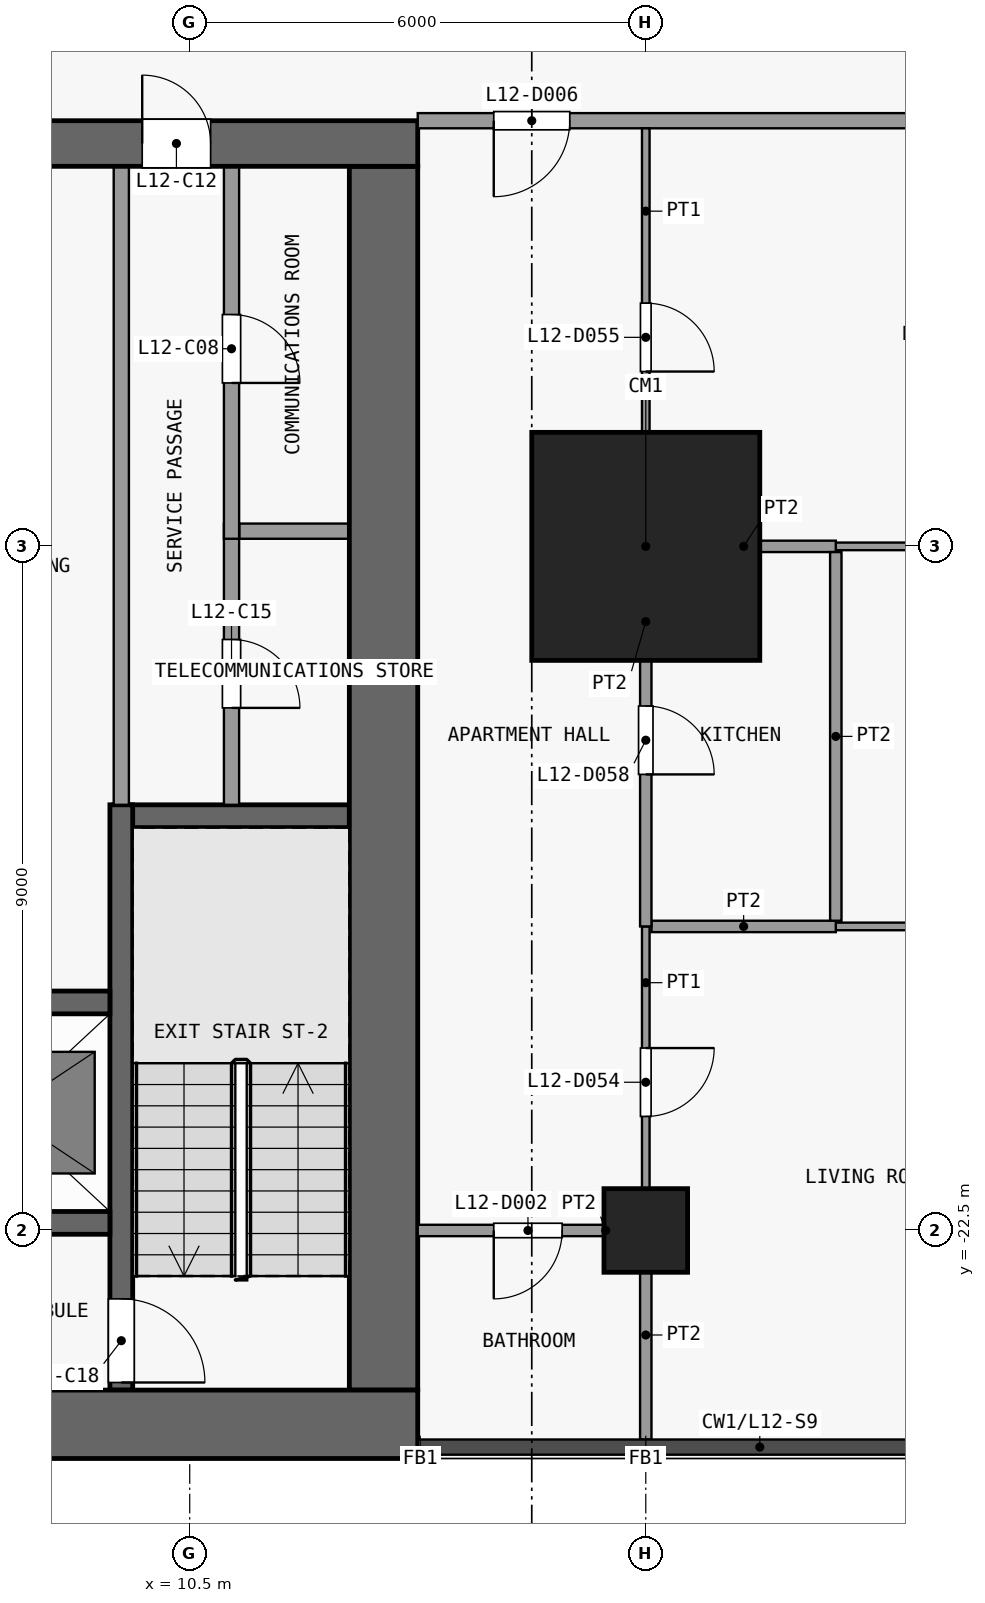
"""IFC4 building model, lengths in metres.
Left out: names, types, materials, properties, quantities, classifications, styles, units other than length and angle.
Written with IfcOpenShell. Run it as: python <this file> out.ifc"""

import sys

from ifc_helpers import new_model, si_unit, direction, frame, frame_2d, origin, origin_2d, place, context, subcontext, project, spatial, rectangle, extrude, element, fill, save


model = new_model("IFC4")
c1 = context("Model", 3, precision=1e-05, world=origin(), true_north=direction((0.0, 1.0)))
c2 = subcontext(c1, "Body", "Model", "MODEL_VIEW")
j1 = project(units=[si_unit("LENGTHUNIT", "METRE"), si_unit("PLANEANGLEUNIT", "RADIAN")], contexts=[c1])
p1 = place(None, origin())
s1 = spatial("IfcSite", under=j1, at=p1, CompositionType="ELEMENT")
p2 = place(p1, origin())
s2 = spatial("IfcBuilding", under=s1, at=p2, CompositionType="ELEMENT")
p3 = place(p2, frame((0.0, 0.0, 54.1)))
s3 = spatial("IfcBuildingStorey", under=s2, at=p3, CompositionType="ELEMENT", Elevation=54.1)
p4 = place(p3, frame((16.5, -22.5, 0.0), z_axis=(0.0, 0.0, 1.0), x_axis=(1.0, 0.0, 0.0)))
e1 = element("IfcColumn", 1, at=p4, inside=s3, PredefinedType="COLUMN", context=c2, shape_type="SweptSolid", body=[
    extrude(rectangle(XDim=1.1, YDim=1.1, at=origin_2d()), origin(), (0.0, 0.0, 1.0), 3.6),
])
p5 = place(p3, frame((16.5, -13.5, 0.0), z_axis=(0.0, 0.0, 1.0), x_axis=(1.0, 0.0, 0.0)))
e2 = element("IfcColumn", 2, at=p5, inside=s3, PredefinedType="COLUMN", context=c2, shape_type="SweptSolid", body=[
    extrude(rectangle(XDim=3.0, YDim=3.0, at=origin_2d()), origin(), (0.0, 0.0, 1.0), 3.6),
])
p6 = place(p3, frame((-13.5, -25.05, 0.0), z_axis=(0.0, 0.0, 1.0), x_axis=(1.0, 0.0, 0.0)))
e3 = element("IfcWall", 3, at=p6, inside=s3, PredefinedType="SHEAR", context=c2, shape_type="SweptSolid", body=[
    extrude(rectangle(XDim=27.0, YDim=0.9, at=frame_2d((13.5, 0.0))), origin(), (0.0, 0.0, 1.0), 3.3),
])
p7 = place(p3, frame((-13.5, -8.2, 0.0), z_axis=(0.0, 0.0, 1.0), x_axis=(1.0, 0.0, 0.0)))
e4 = element("IfcWall", 4, at=p7, inside=s3, PredefinedType="SHEAR", context=c2, shape_type="SweptSolid", body=[
    extrude(rectangle(XDim=27.0, YDim=0.6, at=frame_2d((13.5, 0.0))), origin(), (0.0, 0.0, 1.0), 3.3),
])
p8 = place(p7, frame((7.8, 0.0, 0.0)))
e5 = element("IfcOpeningElement", 5, at=p8, cuts=e4, PredefinedType="OPENING", context=c2, shape_type="SweptSolid", body=[
    extrude(rectangle(XDim=1.8, YDim=2.1, at=frame_2d((0.9, 1.05))), frame((0.0, 0.31, 0.0), z_axis=(0.0, -1.0, 0.0), x_axis=(1.0, 0.0, 0.0)), (0.0, 0.0, 1.0), 0.62),
])
p9 = place(p7, frame((17.4, 0.0, 0.0)))
e6 = element("IfcOpeningElement", 6, at=p9, cuts=e4, PredefinedType="OPENING", context=c2, shape_type="SweptSolid", body=[
    extrude(rectangle(XDim=1.8, YDim=2.1, at=frame_2d((0.9, 1.05))), frame((0.0, 0.31, 0.0), z_axis=(0.0, -1.0, 0.0), x_axis=(1.0, 0.0, 0.0)), (0.0, 0.0, 1.0), 0.62),
])
p10 = place(p7, frame((2.725, 0.0, 0.0)))
e7 = element("IfcOpeningElement", 7, at=p10, cuts=e4, PredefinedType="OPENING", context=c2, shape_type="SweptSolid", body=[
    extrude(rectangle(XDim=0.9, YDim=2.1, at=frame_2d((0.45, 1.05))), frame((0.0, 0.31, 0.0), z_axis=(0.0, -1.0, 0.0), x_axis=(1.0, 0.0, 0.0)), (0.0, 0.0, 1.0), 0.62),
])
p11 = place(p7, frame((23.375, 0.0, 0.0)))
e8 = element("IfcOpeningElement", 8, at=p11, cuts=e4, PredefinedType="OPENING", context=c2, shape_type="SweptSolid", body=[
    extrude(rectangle(XDim=0.9, YDim=2.1, at=frame_2d((0.45, 1.05))), frame((0.0, 0.31, 0.0), z_axis=(0.0, -1.0, 0.0), x_axis=(1.0, 0.0, 0.0)), (0.0, 0.0, 1.0), 0.62),
])
p12 = place(p3, frame((13.05, -24.6, 0.0), z_axis=(0.0, 0.0, 1.0), x_axis=(0.0, 1.0, 0.0)))
e9 = element("IfcWall", 9, at=p12, inside=s3, PredefinedType="SHEAR", context=c2, shape_type="SweptSolid", body=[
    extrude(rectangle(XDim=16.1, YDim=0.9, at=frame_2d((8.05, 0.0))), origin(), (0.0, 0.0, 1.0), 3.3),
])
p13 = place(p3, frame((6.35, -22.4, 0.0), z_axis=(0.0, 0.0, 1.0), x_axis=(1.0, 0.0, 0.0)))
e10 = element("IfcWall", 10, at=p13, inside=s3, PredefinedType="SHEAR", context=c2, shape_type="SweptSolid", body=[
    extrude(rectangle(XDim=3.1, YDim=0.3, at=frame_2d((1.55, 0.0))), origin(), (0.0, 0.0, 1.0), 3.3),
])
p14 = place(p3, frame((6.425, -19.5, 0.0), z_axis=(0.0, 0.0, 1.0), x_axis=(1.0, 0.0, 0.0)))
e11 = element("IfcWall", 11, at=p14, inside=s3, PredefinedType="SHEAR", context=c2, shape_type="SweptSolid", body=[
    extrude(rectangle(XDim=3.025, YDim=0.3, at=frame_2d((1.512, 0.0))), origin(), (0.0, 0.0, 1.0), 3.3),
])
p15 = place(p3, frame((9.5, -17.05, 0.0), z_axis=(0.0, 0.0, 1.0), x_axis=(1.0, 0.0, 0.0)))
e12 = element("IfcWall", 12, at=p15, inside=s3, PredefinedType="SHEAR", context=c2, shape_type="SweptSolid", body=[
    extrude(rectangle(XDim=3.1, YDim=0.3, at=frame_2d((1.55, 0.0))), origin(), (0.0, 0.0, 1.0), 3.3),
])
p16 = place(p3, frame((11.15, -13.3, 0.0), z_axis=(0.0, 0.0, 1.0), x_axis=(1.0, 0.0, 0.0)))
e13 = element("IfcWall", 13, at=p16, inside=s3, PredefinedType="PARTITIONING", context=c2, shape_type="SweptSolid", body=[
    extrude(rectangle(XDim=1.45, YDim=0.2, at=frame_2d((0.725, 0.0))), origin(), (0.0, 0.0, 1.0), 3.3),
])
p17 = place(p3, frame((9.6, -16.9, 0.0), z_axis=(0.0, 0.0, 1.0), x_axis=(0.0, -1.0, 0.0)))
e14 = element("IfcWall", 14, at=p17, inside=s3, PredefinedType="SHEAR", context=c2, shape_type="SweptSolid", body=[
    extrude(rectangle(XDim=7.7, YDim=0.3, at=frame_2d((3.85, 0.0))), origin(), (0.0, 0.0, 1.0), 3.3),
])
p18 = place(p17, frame((6.5, 0.0, 0.0)))
e15 = element("IfcOpeningElement", 15, at=p18, cuts=e14, PredefinedType="OPENING", context=c2, shape_type="SweptSolid", body=[
    extrude(rectangle(XDim=1.1, YDim=2.1, at=frame_2d((0.55, 1.05))), frame((0.0, 0.16, 0.0), z_axis=(0.0, -1.0, 0.0), x_axis=(1.0, 0.0, 0.0)), (0.0, 0.0, 1.0), 0.32),
])
p19 = place(p3, frame((9.6, -16.9, 0.0), z_axis=(0.0, 0.0, 1.0), x_axis=(0.0, 1.0, 0.0)))
e16 = element("IfcWall", 16, at=p19, inside=s3, PredefinedType="PARTITIONING", context=c2, shape_type="SweptSolid", body=[
    extrude(rectangle(XDim=8.4, YDim=0.2, at=frame_2d((4.2, 0.0))), origin(), (0.0, 0.0, 1.0), 3.3),
])
p20 = place(p3, frame((11.05, -13.2, 0.0), z_axis=(0.0, 0.0, 1.0), x_axis=(0.0, -1.0, 0.0)))
e17 = element("IfcWall", 17, at=p20, inside=s3, PredefinedType="PARTITIONING", context=c2, shape_type="SweptSolid", body=[
    extrude(rectangle(XDim=3.7, YDim=0.2, at=frame_2d((1.85, 0.0))), origin(), (0.0, 0.0, 1.0), 3.3),
])
p21 = place(p20, frame((1.525, 0.0, 0.0)))
e18 = element("IfcOpeningElement", 18, at=p21, cuts=e17, PredefinedType="OPENING", context=c2, shape_type="SweptSolid", body=[
    extrude(rectangle(XDim=0.9, YDim=2.1, at=frame_2d((0.45, 1.05))), frame((0.0, 0.11, 0.0), z_axis=(0.0, -1.0, 0.0), x_axis=(1.0, 0.0, 0.0)), (0.0, 0.0, 1.0), 0.22),
])
p22 = place(p3, frame((11.05, -8.5, 0.0), z_axis=(0.0, 0.0, 1.0), x_axis=(0.0, -1.0, 0.0)))
e19 = element("IfcWall", 19, at=p22, inside=s3, PredefinedType="PARTITIONING", context=c2, shape_type="SweptSolid", body=[
    extrude(rectangle(XDim=4.9, YDim=0.2, at=frame_2d((2.45, 0.0))), origin(), (0.0, 0.0, 1.0), 3.3),
])
p23 = place(p22, frame((1.95, 0.0, 0.0)))
e20 = element("IfcOpeningElement", 20, at=p23, cuts=e19, PredefinedType="OPENING", context=c2, shape_type="SweptSolid", body=[
    extrude(rectangle(XDim=0.9, YDim=2.1, at=frame_2d((0.45, 1.05))), frame((0.0, 0.11, 0.0), z_axis=(0.0, -1.0, 0.0), x_axis=(1.0, 0.0, 0.0)), (0.0, 0.0, 1.0), 0.22),
])
p24 = place(p3, frame((13.5, -22.5, 0.0), z_axis=(0.0, 0.0, 1.0), x_axis=(1.0, 0.0, 0.0)))
e21 = element("IfcWall", 21, at=p24, inside=s3, PredefinedType="PARTITIONING", context=c2, shape_type="SweptSolid", body=[
    extrude(rectangle(XDim=2.925, YDim=0.15, at=frame_2d((1.462, 0.0))), origin(), (0.0, 0.0, 1.0), 3.3),
])
p25 = place(p24, frame((1.0, 0.0, 0.0)))
e22 = element("IfcOpeningElement", 22, at=p25, cuts=e21, PredefinedType="OPENING", context=c2, shape_type="SweptSolid", body=[
    extrude(rectangle(XDim=0.9, YDim=2.1, at=frame_2d((0.45, 1.05))), frame((0.0, 0.085, 0.0), z_axis=(0.0, -1.0, 0.0), x_axis=(1.0, 0.0, 0.0)), (0.0, 0.0, 1.0), 0.17),
])
p26 = place(p3, frame((19.0, -18.5, 0.0), z_axis=(0.0, 0.0, 1.0), x_axis=(1.0, 0.0, 0.0)))
e23 = element("IfcWall", 23, at=p26, inside=s3, PredefinedType="PARTITIONING", context=c2, shape_type="SweptSolid", body=[
    extrude(rectangle(XDim=6.25, YDim=0.1, at=frame_2d((3.125, 0.0))), origin(), (0.0, 0.0, 1.0), 3.3),
])
p27 = place(p26, frame((2.7, 0.0, 0.0)))
e24 = element("IfcOpeningElement", 24, at=p27, cuts=e23, PredefinedType="OPENING", context=c2, shape_type="SweptSolid", body=[
    extrude(rectangle(XDim=0.9, YDim=2.1, at=frame_2d((0.45, 1.05))), frame((0.0, 0.06, 0.0), z_axis=(0.0, -1.0, 0.0), x_axis=(1.0, 0.0, 0.0)), (0.0, 0.0, 1.0), 0.12),
])
p28 = place(p3, frame((16.575, -18.5, 0.0), z_axis=(0.0, 0.0, 1.0), x_axis=(1.0, 0.0, 0.0)))
e25 = element("IfcWall", 25, at=p28, inside=s3, PredefinedType="PARTITIONING", context=c2, shape_type="SweptSolid", body=[
    extrude(rectangle(XDim=2.425, YDim=0.15, at=frame_2d((1.212, 0.0))), origin(), (0.0, 0.0, 1.0), 3.3),
])
p29 = place(p3, frame((19.0, -13.5, 0.0), z_axis=(0.0, 0.0, 1.0), x_axis=(1.0, 0.0, 0.0)))
e26 = element("IfcWall", 26, at=p29, inside=s3, PredefinedType="PARTITIONING", context=c2, shape_type="SweptSolid", body=[
    extrude(rectangle(XDim=6.25, YDim=0.1, at=frame_2d((3.125, 0.0))), origin(), (0.0, 0.0, 1.0), 3.3),
])
p30 = place(p3, frame((16.575, -13.5, 0.0), z_axis=(0.0, 0.0, 1.0), x_axis=(1.0, 0.0, 0.0)))
e27 = element("IfcWall", 27, at=p30, inside=s3, PredefinedType="PARTITIONING", context=c2, shape_type="SweptSolid", body=[
    extrude(rectangle(XDim=2.425, YDim=0.15, at=frame_2d((1.212, 0.0))), origin(), (0.0, 0.0, 1.0), 3.3),
])
p31 = place(p3, frame((13.5, -7.9, 0.0), z_axis=(0.0, 0.0, 1.0), x_axis=(1.0, 0.0, 0.0)))
e28 = element("IfcWall", 28, at=p31, inside=s3, PredefinedType="PARTITIONING", context=c2, shape_type="SweptSolid", body=[
    extrude(rectangle(XDim=11.75, YDim=0.2, at=frame_2d((5.875, 0.0))), origin(), (0.0, 0.0, 1.0), 3.3),
])
p32 = place(p31, frame((1.0, 0.0, 0.0)))
e29 = element("IfcOpeningElement", 29, at=p32, cuts=e28, PredefinedType="OPENING", context=c2, shape_type="SweptSolid", body=[
    extrude(rectangle(XDim=1.0, YDim=2.1, at=frame_2d((0.5, 1.05))), frame((0.0, 0.11, 0.0), z_axis=(0.0, -1.0, 0.0), x_axis=(1.0, 0.0, 0.0)), (0.0, 0.0, 1.0), 0.22),
])
p33 = place(p3, frame((16.5, -22.5, 0.0), z_axis=(0.0, 0.0, 1.0), x_axis=(0.0, 1.0, 0.0)))
e30 = element("IfcWall", 30, at=p33, inside=s3, PredefinedType="PARTITIONING", context=c2, shape_type="SweptSolid", body=[
    extrude(rectangle(XDim=4.0, YDim=0.1, at=frame_2d((2.0, 0.0))), origin(), (0.0, 0.0, 1.0), 3.3),
])
p34 = place(p33, frame((1.5, 0.0, 0.0)))
e31 = element("IfcOpeningElement", 31, at=p34, cuts=e30, PredefinedType="OPENING", context=c2, shape_type="SweptSolid", body=[
    extrude(rectangle(XDim=0.9, YDim=2.1, at=frame_2d((0.45, 1.05))), frame((0.0, 0.06, 0.0), z_axis=(0.0, -1.0, 0.0), x_axis=(1.0, 0.0, 0.0)), (0.0, 0.0, 1.0), 0.12),
])
p35 = place(p3, frame((16.5, -13.5, 0.0), z_axis=(0.0, 0.0, 1.0), x_axis=(0.0, 1.0, 0.0)))
e32 = element("IfcWall", 32, at=p35, inside=s3, PredefinedType="PARTITIONING", context=c2, shape_type="SweptSolid", body=[
    extrude(rectangle(XDim=5.5, YDim=0.1, at=frame_2d((2.75, 0.0))), origin(), (0.0, 0.0, 1.0), 3.3),
])
p36 = place(p35, frame((2.3, 0.0, 0.0)))
e33 = element("IfcOpeningElement", 33, at=p36, cuts=e32, PredefinedType="OPENING", context=c2, shape_type="SweptSolid", body=[
    extrude(rectangle(XDim=0.9, YDim=2.1, at=frame_2d((0.45, 1.05))), frame((0.0, 0.06, 0.0), z_axis=(0.0, -1.0, 0.0), x_axis=(1.0, 0.0, 0.0)), (0.0, 0.0, 1.0), 0.12),
])
p37 = place(p3, frame((16.5, -25.25, 0.0), z_axis=(0.0, 0.0, 1.0), x_axis=(0.0, 1.0, 0.0)))
e34 = element("IfcWall", 34, at=p37, inside=s3, PredefinedType="PARTITIONING", context=c2, shape_type="SweptSolid", body=[
    extrude(rectangle(XDim=2.75, YDim=0.15, at=frame_2d((1.375, 0.0))), origin(), (0.0, 0.0, 1.0), 3.3),
])
p38 = place(p3, frame((16.5, -18.5, 0.0), z_axis=(0.0, 0.0, 1.0), x_axis=(0.0, 1.0, 0.0)))
e35 = element("IfcWall", 35, at=p38, inside=s3, PredefinedType="PARTITIONING", context=c2, shape_type="SweptSolid", body=[
    extrude(rectangle(XDim=5.0, YDim=0.15, at=frame_2d((2.5, 0.0))), origin(), (0.0, 0.0, 1.0), 3.3),
])
p39 = place(p38, frame((2.0, 0.0, 0.0)))
e36 = element("IfcOpeningElement", 36, at=p39, cuts=e35, PredefinedType="OPENING", context=c2, shape_type="SweptSolid", body=[
    extrude(rectangle(XDim=0.9, YDim=2.1, at=frame_2d((0.45, 1.05))), frame((0.0, 0.085, 0.0), z_axis=(0.0, -1.0, 0.0), x_axis=(1.0, 0.0, 0.0)), (0.0, 0.0, 1.0), 0.17),
])
p40 = place(p3, frame((19.0, -18.425, 0.0), z_axis=(0.0, 0.0, 1.0), x_axis=(0.0, 1.0, 0.0)))
e37 = element("IfcWall", 37, at=p40, inside=s3, PredefinedType="PARTITIONING", context=c2, shape_type="SweptSolid", body=[
    extrude(rectangle(XDim=4.85, YDim=0.15, at=frame_2d((2.425, 0.0))), origin(), (0.0, 0.0, 1.0), 3.3),
])
p41 = place(p23, origin())
e38 = element("IfcDoor", 38, at=p41, inside=s3, OperationType="SINGLE_SWING_RIGHT", PredefinedType="DOOR", context=c2, shape_type="SweptSolid", body=[
    extrude(rectangle(XDim=0.9, YDim=2.1, at=frame_2d((0.45, 1.05))), frame((0.0, 0.025, 0.0), z_axis=(0.0, -1.0, 0.0), x_axis=(1.0, 0.0, 0.0)), (0.0, 0.0, 1.0), 0.05),
])
fill(e20, e38)
p42 = place(p11, origin())
e39 = element("IfcDoor", 39, at=p42, inside=s3, OperationType="SINGLE_SWING_LEFT", PredefinedType="DOOR", context=c2, shape_type="SweptSolid", body=[
    extrude(rectangle(XDim=0.9, YDim=2.1, at=frame_2d((0.45, 1.05))), frame((0.0, 0.025, 0.0), z_axis=(0.0, -1.0, 0.0), x_axis=(1.0, 0.0, 0.0)), (0.0, 0.0, 1.0), 0.05),
])
fill(e8, e39)
p43 = place(p21, origin())
e40 = element("IfcDoor", 40, at=p43, inside=s3, OperationType="SINGLE_SWING_RIGHT", PredefinedType="DOOR", context=c2, shape_type="SweptSolid", body=[
    extrude(rectangle(XDim=0.9, YDim=2.1, at=frame_2d((0.45, 1.05))), frame((0.0, 0.025, 0.0), z_axis=(0.0, -1.0, 0.0), x_axis=(1.0, 0.0, 0.0)), (0.0, 0.0, 1.0), 0.05),
])
fill(e18, e40)
p44 = place(p18, origin())
e41 = element("IfcDoor", 41, at=p44, inside=s3, OperationType="SINGLE_SWING_RIGHT", PredefinedType="DOOR", context=c2, shape_type="SweptSolid", body=[
    extrude(rectangle(XDim=1.1, YDim=2.1, at=frame_2d((0.55, 1.05))), frame((0.0, 0.025, 0.0), z_axis=(0.0, -1.0, 0.0), x_axis=(1.0, 0.0, 0.0)), (0.0, 0.0, 1.0), 0.05),
])
fill(e15, e41)
p45 = place(p25, origin())
e42 = element("IfcDoor", 42, at=p45, inside=s3, OperationType="SINGLE_SWING_LEFT", PredefinedType="DOOR", context=c2, shape_type="SweptSolid", body=[
    extrude(rectangle(XDim=0.9, YDim=2.1, at=frame_2d((0.45, 1.05))), frame((0.0, 0.025, 0.0), z_axis=(0.0, -1.0, 0.0), x_axis=(1.0, 0.0, 0.0)), (0.0, 0.0, 1.0), 0.05),
])
fill(e22, e42)
p46 = place(p32, origin())
e43 = element("IfcDoor", 43, at=p46, inside=s3, OperationType="SINGLE_SWING_LEFT", PredefinedType="DOOR", context=c2, shape_type="SweptSolid", body=[
    extrude(rectangle(XDim=1.0, YDim=2.1, at=frame_2d((0.5, 1.05))), frame((0.0, 0.025, 0.0), z_axis=(0.0, -1.0, 0.0), x_axis=(1.0, 0.0, 0.0)), (0.0, 0.0, 1.0), 0.05),
])
fill(e29, e43)
p47 = place(p34, origin())
e44 = element("IfcDoor", 44, at=p47, inside=s3, OperationType="SINGLE_SWING_RIGHT", PredefinedType="DOOR", context=c2, shape_type="SweptSolid", body=[
    extrude(rectangle(XDim=0.9, YDim=2.1, at=frame_2d((0.45, 1.05))), frame((0.0, 0.025, 0.0), z_axis=(0.0, -1.0, 0.0), x_axis=(1.0, 0.0, 0.0)), (0.0, 0.0, 1.0), 0.05),
])
fill(e31, e44)
p48 = place(p36, origin())
e45 = element("IfcDoor", 45, at=p48, inside=s3, OperationType="SINGLE_SWING_LEFT", PredefinedType="DOOR", context=c2, shape_type="SweptSolid", body=[
    extrude(rectangle(XDim=0.9, YDim=2.1, at=frame_2d((0.45, 1.05))), frame((0.0, 0.025, 0.0), z_axis=(0.0, -1.0, 0.0), x_axis=(1.0, 0.0, 0.0)), (0.0, 0.0, 1.0), 0.05),
])
fill(e33, e45)
p49 = place(p39, origin())
e46 = element("IfcDoor", 46, at=p49, inside=s3, OperationType="SINGLE_SWING_LEFT", PredefinedType="DOOR", context=c2, shape_type="SweptSolid", body=[
    extrude(rectangle(XDim=0.9, YDim=2.1, at=frame_2d((0.45, 1.05))), frame((0.0, 0.025, 0.0), z_axis=(0.0, -1.0, 0.0), x_axis=(1.0, 0.0, 0.0)), (0.0, 0.0, 1.0), 0.05),
])
fill(e36, e46)
save(model, sys.argv[1])
